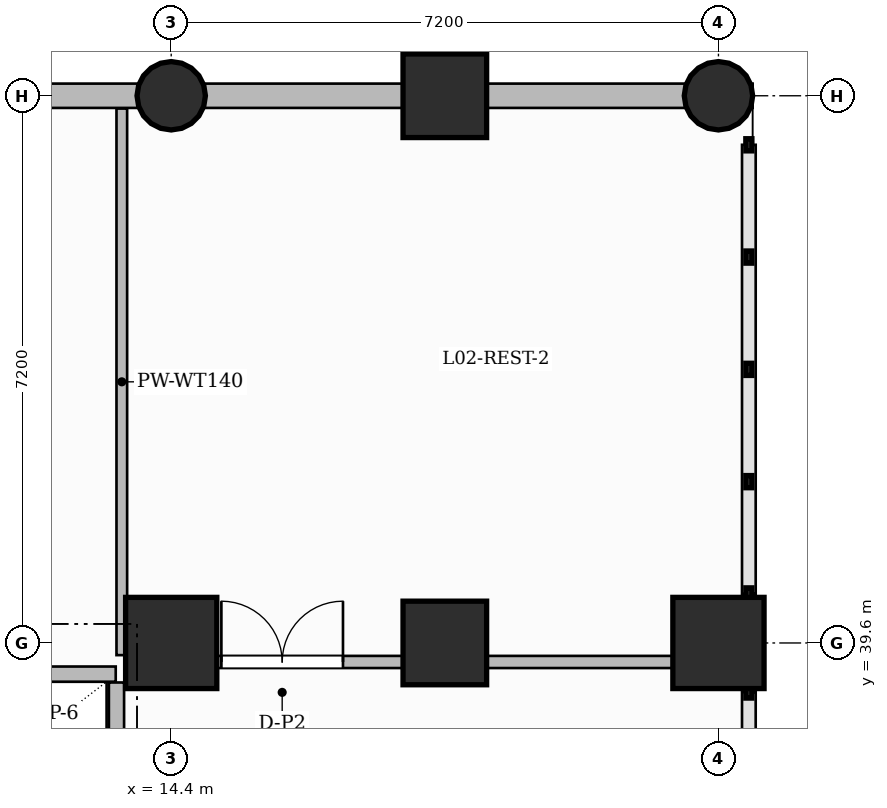
"""IFC4 building model, lengths in metres.
Left out: names, types, materials, properties, quantities, classifications, styles, units other than length and angle.
Written with IfcOpenShell. Run it as: python <this file> out.ifc"""

import sys

from ifc_helpers import new_model, si_unit, direction, frame, frame_2d, origin, origin_2d, place, context, subcontext, project, spatial, rectangle, circle, extrude, source, transform, mapped, element, fill, save


model = new_model("IFC4")
c1 = context("Model", 3, precision=1e-05, world=origin(), true_north=direction((0.0, 1.0)))
c2 = subcontext(c1, "Body", "Model", "MODEL_VIEW")
j1 = project(units=[si_unit("LENGTHUNIT", "METRE"), si_unit("PLANEANGLEUNIT", "RADIAN")], contexts=[c1])
p1 = place(None, origin())
s1 = spatial("IfcSite", under=j1, at=p1, CompositionType="ELEMENT")
p2 = place(p1, origin())
s2 = spatial("IfcBuilding", under=s1, at=p2, CompositionType="ELEMENT")
p3 = place(p2, frame((0.0, 0.0, 10.8)))
s3 = spatial("IfcBuildingStorey", under=s2, at=p3, CompositionType="ELEMENT", Elevation=10.8)
m1 = source(origin(), c2, "Body", "SweptSolid", [
    extrude(rectangle(XDim=1.2, YDim=1.2, at=origin_2d()), origin(), (0.0, 0.0, 1.0), 5.4),
])
p4 = place(p3, frame((14.4, 39.6, 0.0), z_axis=(0.0, 0.0, 1.0), x_axis=(1.0, 0.0, 0.0)))
e1 = element("IfcColumn", 1, at=p4, inside=s3, PredefinedType="COLUMN", context=c2, shape_type="MappedRepresentation", body=[
    mapped(m1, transform((0.0, 0.0, 0.0), scale=1.0)),
])
m2 = source(origin(), c2, "Body", "SweptSolid", [
    extrude(circle(Radius=0.45, at=origin_2d()), origin(), (0.0, 0.0, 1.0), 5.4),
])
p5 = place(p3, frame((14.4, 46.8, 0.0), z_axis=(0.0, 0.0, 1.0), x_axis=(1.0, 0.0, 0.0)))
e2 = element("IfcColumn", 2, at=p5, inside=s3, PredefinedType="COLUMN", context=c2, shape_type="MappedRepresentation", body=[
    mapped(m2, transform((0.0, 0.0, 0.0), scale=1.0)),
])
p6 = place(p3, frame((21.6, 39.6, 0.0), z_axis=(0.0, 0.0, 1.0), x_axis=(1.0, 0.0, 0.0)))
e3 = element("IfcColumn", 3, at=p6, inside=s3, PredefinedType="COLUMN", context=c2, shape_type="MappedRepresentation", body=[
    mapped(m1, transform((0.0, 0.0, 0.0), scale=1.0)),
])
p7 = place(p3, frame((21.6, 46.8, 0.0), z_axis=(0.0, 0.0, 1.0), x_axis=(1.0, 0.0, 0.0)))
e4 = element("IfcColumn", 4, at=p7, inside=s3, PredefinedType="COLUMN", context=c2, shape_type="MappedRepresentation", body=[
    mapped(m2, transform((0.0, 0.0, 0.0), scale=1.0)),
])
m3 = source(origin(), c2, "Body", "SweptSolid", [
    extrude(rectangle(XDim=1.1, YDim=1.1, at=origin_2d()), origin(), (0.0, 0.0, 1.0), 5.4),
])
for number, where, z_axis, x_axis in (
    (5, (18.0, 39.6, 0.0), (0.0, 0.0, 1.0), (1.0, 0.0, 0.0)),
    (6, (18.0, 46.8, 0.0), (0.0, 0.0, 1.0), (1.0, 0.0, 0.0)),
):
    element("IfcColumn", number, at=place(p3, frame(where, z_axis=z_axis, x_axis=x_axis)), inside=s3, PredefinedType="COLUMN", context=c2, shape_type="MappedRepresentation", body=[
        mapped(m3, transform((0.0, 0.0, 0.0), scale=1.0)),
    ])
p8 = place(p3, frame((11.71, 39.19, 0.0), z_axis=(0.0, 0.0, 1.0), x_axis=(1.0, 0.0, 0.0)))
e7 = element("IfcWall", 7, at=p8, inside=s3, PredefinedType="PARTITIONING", context=c2, shape_type="SweptSolid", body=[
    extrude(rectangle(XDim=1.96, YDim=0.2, at=frame_2d((0.98, 0.0))), origin(), (0.0, 0.0, 1.0), 5.1),
])
p9 = place(p3, frame((13.68, 34.36, 0.0), z_axis=(0.0, 0.0, 1.0), x_axis=(0.0, 1.0, 0.0)))
e8 = element("IfcWall", 8, at=p9, inside=s3, PredefinedType="PARTITIONING", context=c2, shape_type="SweptSolid", body=[
    extrude(rectangle(XDim=4.72, YDim=0.2, at=frame_2d((2.36, 0.0))), origin(), (0.0, 0.0, 1.0), 5.1),
])
p10 = place(p3, frame((13.75, 39.44, 0.0), z_axis=(0.0, 0.0, 1.0), x_axis=(0.0, 1.0, 0.0)))
e9 = element("IfcWall", 9, at=p10, inside=s3, PredefinedType="PARTITIONING", context=c2, shape_type="SweptSolid", body=[
    extrude(rectangle(XDim=7.192, YDim=0.14, at=frame_2d((3.596, 0.0))), origin(), (0.0, 0.0, 1.0), 5.1),
])
p11 = place(p3, frame((13.84, 39.35, 0.0), z_axis=(0.0, 0.0, 1.0), x_axis=(1.0, 0.0, 0.0)))
e10 = element("IfcWall", 10, at=p11, inside=s3, PredefinedType="PARTITIONING", context=c2, shape_type="SweptSolid", body=[
    extrude(rectangle(XDim=7.92, YDim=0.16, at=frame_2d((3.96, 0.0))), origin(), (0.0, 0.0, 1.0), 4.185),
])
p12 = place(p11, frame((1.22, 0.0, 0.0)))
e11 = element("IfcOpeningElement", 11, at=p12, cuts=e10, PredefinedType="OPENING", context=c2, shape_type="SweptSolid", body=[
    extrude(rectangle(XDim=1.6, YDim=2.4, at=frame_2d((0.8, 1.2))), frame((0.0, 0.09, 0.0), z_axis=(0.0, -1.0, 0.0), x_axis=(1.0, 0.0, 0.0)), (0.0, 0.0, 1.0), 0.18),
])
p13 = place(p3, frame((-4.8, 46.8, 0.0), z_axis=(0.0, 0.0, 1.0), x_axis=(1.0, 0.0, 0.0)))
e12 = element("IfcWall", 12, at=p13, inside=s3, PredefinedType="SOLIDWALL", context=c2, shape_type="SweptSolid", body=[
    extrude(rectangle(XDim=26.85, YDim=0.32, at=frame_2d((13.425, 0.0))), origin(), (0.0, 0.0, 1.0), 4.185),
])
p14 = place(p13, frame((1.4, 0.0, 0.75)))
e13 = element("IfcOpeningElement", 13, at=p14, cuts=e12, PredefinedType="OPENING", context=c2, shape_type="SweptSolid", body=[
    extrude(rectangle(XDim=2.0, YDim=2.6, at=frame_2d((1.0, 1.3))), frame((0.0, 0.17, 0.0), z_axis=(0.0, -1.0, 0.0), x_axis=(1.0, 0.0, 0.0)), (0.0, 0.0, 1.0), 0.34),
])
p15 = place(p13, frame((7.4, 0.0, 0.75)))
e14 = element("IfcOpeningElement", 14, at=p15, cuts=e12, PredefinedType="OPENING", context=c2, shape_type="SweptSolid", body=[
    extrude(rectangle(XDim=2.0, YDim=2.6, at=frame_2d((1.0, 1.3))), frame((0.0, 0.17, 0.0), z_axis=(0.0, -1.0, 0.0), x_axis=(1.0, 0.0, 0.0)), (0.0, 0.0, 1.0), 0.34),
])
p16 = place(p13, frame((14.6, 0.0, 0.75)))
e15 = element("IfcOpeningElement", 15, at=p16, cuts=e12, PredefinedType="OPENING", context=c2, shape_type="SweptSolid", body=[
    extrude(rectangle(XDim=2.0, YDim=2.6, at=frame_2d((1.0, 1.3))), frame((0.0, 0.17, 0.0), z_axis=(0.0, -1.0, 0.0), x_axis=(1.0, 0.0, 0.0)), (0.0, 0.0, 1.0), 0.34),
])
m4 = source(origin(), c2, "Body", "SweptSolid", [
    extrude(rectangle(XDim=1.6, YDim=2.4, at=frame_2d((0.8, 1.2))), frame((0.0, 0.025, 0.0), z_axis=(0.0, -1.0, 0.0), x_axis=(1.0, 0.0, 0.0)), (0.0, 0.0, 1.0), 0.05),
])
p17 = place(p12, origin())
e16 = element("IfcDoor", 16, at=p17, inside=s3, OperationType="DOUBLE_DOOR_SINGLE_SWING", PredefinedType="DOOR", context=c2, shape_type="MappedRepresentation", body=[
    mapped(m4, transform((0.0, 0.0, 0.0), scale=1.0)),
])
fill(e11, e16)
save(model, sys.argv[1])
